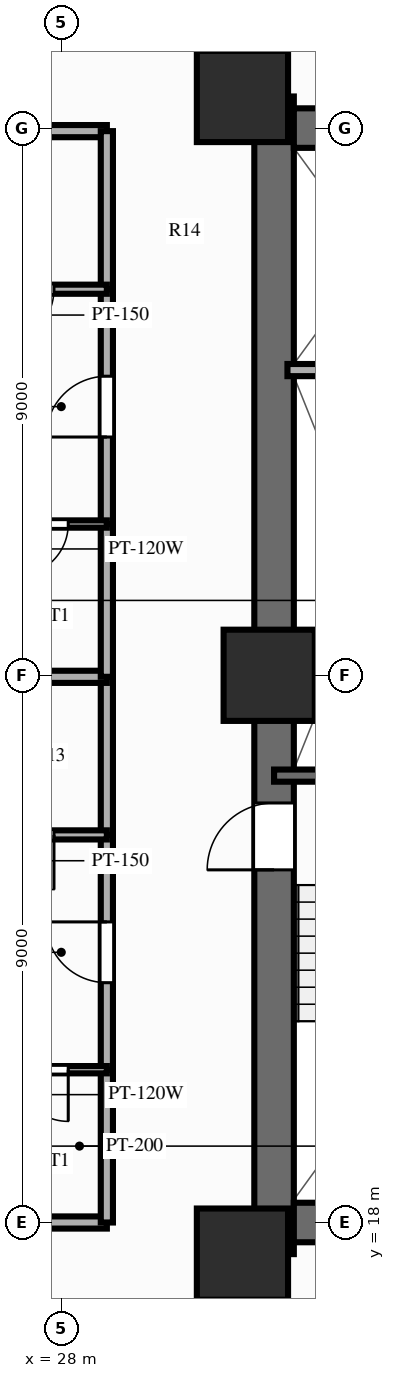
"""IFC4 building model, lengths in metres.
Left out: names, types, materials, properties, quantities, classifications, styles, units other than length and angle.
Written with IfcOpenShell. Run it as: python <this file> out.ifc"""

import sys

from ifc_helpers import new_model, si_unit, direction, frame, frame_2d, origin, origin_2d, place, context, subcontext, project, spatial, rectangle, extrude, source, transform, mapped, element, fill, save


model = new_model("IFC4")
c1 = context("Model", 3, precision=1e-05, world=origin(), true_north=direction((0.0, 1.0)))
c2 = subcontext(c1, "Body", "Model", "MODEL_VIEW")
j1 = project(units=[si_unit("LENGTHUNIT", "METRE"), si_unit("PLANEANGLEUNIT", "RADIAN")], contexts=[c1])
p1 = place(None, origin())
s1 = spatial("IfcSite", under=j1, at=p1, CompositionType="ELEMENT")
p2 = place(p1, origin())
s2 = spatial("IfcBuilding", under=s1, at=p2, CompositionType="ELEMENT")
p3 = place(p2, frame((0.0, 0.0, 52.4)))
s3 = spatial("IfcBuildingStorey", under=s2, at=p3, CompositionType="ELEMENT", Elevation=52.4)
p4 = place(p3, frame((31.5, 17.48, 0.0), z_axis=(0.0, 0.0, 1.0), x_axis=(0.0, 1.0, 0.0)))
e1 = element("IfcWall", 1, at=p4, inside=s3, PredefinedType="SHEAR", context=c2, shape_type="SweptSolid", body=[
    extrude(rectangle(XDim=19.04, YDim=0.65, at=frame_2d((9.52, 0.0))), origin(), (0.0, 0.0, 1.0), 3.0),
])
p5 = place(p4, frame((6.32, 0.0, 0.0)))
e2 = element("IfcOpeningElement", 2, at=p5, cuts=e1, PredefinedType="OPENING", context=c2, shape_type="SweptSolid", body=[
    extrude(rectangle(XDim=1.1, YDim=2.15, at=frame_2d((0.55, 1.075))), frame((0.0, 0.337, 0.0), z_axis=(0.0, -1.0, 0.0), x_axis=(1.0, 0.0, 0.0)), (0.0, 0.0, 1.0), 0.674),
])
p6 = place(p3, frame((31.825, 18.0, 0.0), z_axis=(0.0, 0.0, 1.0), x_axis=(1.0, 0.0, 0.0)))
e3 = element("IfcWall", 3, at=p6, inside=s3, PredefinedType="SHEAR", context=c2, shape_type="SweptSolid", body=[
    extrude(rectangle(XDim=12.35, YDim=0.65, at=frame_2d((6.175, 0.0))), origin(), (0.0, 0.0, 1.0), 3.0),
])
p7 = place(p3, frame((31.825, 36.0, 0.0), z_axis=(0.0, 0.0, 1.0), x_axis=(1.0, 0.0, 0.0)))
e4 = element("IfcWall", 4, at=p7, inside=s3, PredefinedType="SHEAR", context=c2, shape_type="SweptSolid", body=[
    extrude(rectangle(XDim=12.35, YDim=0.65, at=frame_2d((6.175, 0.0))), origin(), (0.0, 0.0, 1.0), 3.0),
])
p8 = place(p7, frame((5.125, 0.0, 0.0), z_axis=(0.0, 0.0, 1.0), x_axis=(-1.0, 0.0, 0.0)))
e5 = element("IfcOpeningElement", 5, at=p8, cuts=e4, PredefinedType="OPENING", context=c2, shape_type="SweptSolid", body=[
    extrude(rectangle(XDim=1.4, YDim=2.15, at=frame_2d((0.7, 1.075))), frame((0.0, 0.337, 0.0), z_axis=(0.0, -1.0, 0.0), x_axis=(1.0, 0.0, 0.0)), (0.0, 0.0, 1.0), 0.674),
])
m1 = source(origin(), c2, "Body", "SweptSolid", [
    extrude(rectangle(XDim=1.5, YDim=1.5, at=origin_2d()), origin(), (0.0, 0.0, 1.0), 3.0),
])
for number, where, z_axis, x_axis in (
    (6, (30.98, 17.48, 0.0), (0.0, 0.0, 1.0), (1.0, 0.0, 0.0)),
    (7, (30.98, 36.52, 0.0), (0.0, 0.0, 1.0), (1.0, 0.0, 0.0)),
    (8, (31.42, 27.0, 0.0), (0.0, 0.0, 1.0), (1.0, 0.0, 0.0)),
):
    element("IfcColumn", number, at=place(p3, frame(where, z_axis=z_axis, x_axis=x_axis)), inside=s3, PredefinedType="COLUMN", context=c2, shape_type="MappedRepresentation", body=[
        mapped(m1, transform((0.0, 0.0, 0.0), scale=1.0)),
    ])
p9 = place(p3, frame((31.5, 25.35, 0.0), z_axis=(0.0, 0.0, 1.0), x_axis=(1.0, 0.0, 0.0)))
e9 = element("IfcWall", 9, at=p9, inside=s3, PredefinedType="SOLIDWALL", context=c2, shape_type="SweptSolid", body=[
    extrude(rectangle(XDim=3.93, YDim=0.2, at=frame_2d((1.965, 0.0))), origin(), (0.0, 0.0, 1.0), 2.79),
])
p10 = place(p3, frame((31.72, 32.02, 0.0), z_axis=(0.0, 0.0, 1.0), x_axis=(1.0, 0.0, 0.0)))
e10 = element("IfcWall", 10, at=p10, inside=s3, PredefinedType="PARTITIONING", context=c2, shape_type="SweptSolid", body=[
    extrude(rectangle(XDim=2.8, YDim=0.2, at=frame_2d((1.4, 0.0))), origin(), (0.0, 0.0, 1.0), 2.79),
])
for number, where, z_axis, x_axis in (
    (11, (28.75, 18.0, 0.0), (0.0, 0.0, 1.0), (-1.0, 0.0, 0.0)),
    (12, (28.75, 35.95, 0.0), (0.0, 0.0, 1.0), (-1.0, 0.0, 0.0)),
):
    element("IfcWall", number, at=place(p3, frame(where, z_axis=z_axis, x_axis=x_axis)), inside=s3, PredefinedType="PARTITIONING", context=c2, shape_type="SweptSolid", body=[
        extrude(rectangle(XDim=16.6, YDim=0.2, at=frame_2d((8.3, 0.0))), origin(), (0.0, 0.0, 1.0), 2.24),
    ])
p11 = place(p3, frame((28.75, 18.0, 0.0), z_axis=(0.0, 0.0, 1.0), x_axis=(0.0, 1.0, 0.0)))
e13 = element("IfcWall", 13, at=p11, inside=s3, PredefinedType="PARTITIONING", context=c2, shape_type="SweptSolid", body=[
    extrude(rectangle(XDim=2.513, YDim=0.2, at=frame_2d((1.256, 0.0))), origin(), (0.0, 0.0, 1.0), 2.79),
])
p12 = place(p3, frame((28.75, 20.513, 0.0), z_axis=(0.0, 0.0, 1.0), x_axis=(0.0, 1.0, 0.0)))
e14 = element("IfcWall", 14, at=p12, inside=s3, PredefinedType="PARTITIONING", context=c2, shape_type="SweptSolid", body=[
    extrude(rectangle(XDim=3.862, YDim=0.2, at=frame_2d((1.931, 0.0))), origin(), (0.0, 0.0, 1.0), 2.79),
])
p13 = place(p12, frame((1.431, 0.0, 0.0)))
e15 = element("IfcOpeningElement", 15, at=p13, cuts=e14, PredefinedType="OPENING", context=c2, shape_type="SweptSolid", body=[
    extrude(rectangle(XDim=1.0, YDim=2.15, at=frame_2d((0.5, 1.075))), frame((0.0, 0.112, 0.0), z_axis=(0.0, -1.0, 0.0), x_axis=(1.0, 0.0, 0.0)), (0.0, 0.0, 1.0), 0.224),
])
p14 = place(p3, frame((28.75, 24.375, 0.0), z_axis=(0.0, 0.0, 1.0), x_axis=(0.0, 1.0, 0.0)))
e16 = element("IfcWall", 16, at=p14, inside=s3, PredefinedType="PARTITIONING", context=c2, shape_type="SweptSolid", body=[
    extrude(rectangle(XDim=2.6, YDim=0.2, at=frame_2d((1.3, 0.0))), origin(), (0.0, 0.0, 1.0), 2.79),
])
p15 = place(p3, frame((28.75, 20.513, 0.0), z_axis=(0.0, 0.0, 1.0), x_axis=(-1.0, 0.0, 0.0)))
e17 = element("IfcWall", 17, at=p15, inside=s3, PredefinedType="PARTITIONING", context=c2, shape_type="SweptSolid", body=[
    extrude(rectangle(XDim=2.12, YDim=0.12, at=frame_2d((1.06, 0.0))), origin(), (0.0, 0.0, 1.0), 2.79),
])
p16 = place(p15, frame((0.635, 0.0, 0.0)))
e18 = element("IfcOpeningElement", 18, at=p16, cuts=e17, PredefinedType="OPENING", context=c2, shape_type="SweptSolid", body=[
    extrude(rectangle(XDim=0.85, YDim=2.05, at=frame_2d((0.425, 1.025))), frame((0.0, 0.072, 0.0), z_axis=(0.0, -1.0, 0.0), x_axis=(1.0, 0.0, 0.0)), (0.0, 0.0, 1.0), 0.144),
])
p17 = place(p3, frame((28.75, 24.375, 0.0), z_axis=(0.0, 0.0, 1.0), x_axis=(-1.0, 0.0, 0.0)))
e19 = element("IfcWall", 19, at=p17, inside=s3, PredefinedType="PARTITIONING", context=c2, shape_type="SweptSolid", body=[
    extrude(rectangle(XDim=2.64, YDim=0.15, at=frame_2d((1.32, 0.0))), origin(), (0.0, 0.0, 1.0), 2.79),
])
p18 = place(p17, frame((0.87, 0.0, 0.0)))
e20 = element("IfcOpeningElement", 20, at=p18, cuts=e19, PredefinedType="OPENING", context=c2, shape_type="SweptSolid", body=[
    extrude(rectangle(XDim=0.9, YDim=2.1, at=frame_2d((0.45, 1.05))), frame((0.0, 0.087, 0.0), z_axis=(0.0, -1.0, 0.0), x_axis=(1.0, 0.0, 0.0)), (0.0, 0.0, 1.0), 0.174),
])
p19 = place(p3, frame((28.75, 26.975, 0.0), z_axis=(0.0, 0.0, 1.0), x_axis=(-1.0, 0.0, 0.0)))
e21 = element("IfcWall", 21, at=p19, inside=s3, PredefinedType="PARTITIONING", context=c2, shape_type="SweptSolid", body=[
    extrude(rectangle(XDim=16.6, YDim=0.2, at=frame_2d((8.3, 0.0))), origin(), (0.0, 0.0, 1.0), 2.79),
])
p20 = place(p3, frame((28.75, 26.975, 0.0), z_axis=(0.0, 0.0, 1.0), x_axis=(0.0, 1.0, 0.0)))
e22 = element("IfcWall", 22, at=p20, inside=s3, PredefinedType="PARTITIONING", context=c2, shape_type="SweptSolid", body=[
    extrude(rectangle(XDim=2.513, YDim=0.2, at=frame_2d((1.256, 0.0))), origin(), (0.0, 0.0, 1.0), 2.79),
])
p21 = place(p3, frame((28.75, 29.488, 0.0), z_axis=(0.0, 0.0, 1.0), x_axis=(0.0, 1.0, 0.0)))
e23 = element("IfcWall", 23, at=p21, inside=s3, PredefinedType="PARTITIONING", context=c2, shape_type="SweptSolid", body=[
    extrude(rectangle(XDim=3.862, YDim=0.2, at=frame_2d((1.931, 0.0))), origin(), (0.0, 0.0, 1.0), 2.79),
])
p22 = place(p21, frame((1.431, 0.0, 0.0)))
e24 = element("IfcOpeningElement", 24, at=p22, cuts=e23, PredefinedType="OPENING", context=c2, shape_type="SweptSolid", body=[
    extrude(rectangle(XDim=1.0, YDim=2.15, at=frame_2d((0.5, 1.075))), frame((0.0, 0.112, 0.0), z_axis=(0.0, -1.0, 0.0), x_axis=(1.0, 0.0, 0.0)), (0.0, 0.0, 1.0), 0.224),
])
p23 = place(p3, frame((28.75, 33.35, 0.0), z_axis=(0.0, 0.0, 1.0), x_axis=(0.0, 1.0, 0.0)))
e25 = element("IfcWall", 25, at=p23, inside=s3, PredefinedType="PARTITIONING", context=c2, shape_type="SweptSolid", body=[
    extrude(rectangle(XDim=2.6, YDim=0.2, at=frame_2d((1.3, 0.0))), origin(), (0.0, 0.0, 1.0), 2.79),
])
p24 = place(p3, frame((28.75, 29.488, 0.0), z_axis=(0.0, 0.0, 1.0), x_axis=(-1.0, 0.0, 0.0)))
e26 = element("IfcWall", 26, at=p24, inside=s3, PredefinedType="PARTITIONING", context=c2, shape_type="SweptSolid", body=[
    extrude(rectangle(XDim=2.12, YDim=0.12, at=frame_2d((1.06, 0.0))), origin(), (0.0, 0.0, 1.0), 2.79),
])
p25 = place(p24, frame((0.635, 0.0, 0.0)))
e27 = element("IfcOpeningElement", 27, at=p25, cuts=e26, PredefinedType="OPENING", context=c2, shape_type="SweptSolid", body=[
    extrude(rectangle(XDim=0.85, YDim=2.05, at=frame_2d((0.425, 1.025))), frame((0.0, 0.072, 0.0), z_axis=(0.0, -1.0, 0.0), x_axis=(1.0, 0.0, 0.0)), (0.0, 0.0, 1.0), 0.144),
])
p26 = place(p3, frame((28.75, 33.35, 0.0), z_axis=(0.0, 0.0, 1.0), x_axis=(-1.0, 0.0, 0.0)))
e28 = element("IfcWall", 28, at=p26, inside=s3, PredefinedType="PARTITIONING", context=c2, shape_type="SweptSolid", body=[
    extrude(rectangle(XDim=2.64, YDim=0.15, at=frame_2d((1.32, 0.0))), origin(), (0.0, 0.0, 1.0), 2.79),
])
p27 = place(p26, frame((0.87, 0.0, 0.0)))
e29 = element("IfcOpeningElement", 29, at=p27, cuts=e28, PredefinedType="OPENING", context=c2, shape_type="SweptSolid", body=[
    extrude(rectangle(XDim=0.9, YDim=2.1, at=frame_2d((0.45, 1.05))), frame((0.0, 0.087, 0.0), z_axis=(0.0, -1.0, 0.0), x_axis=(1.0, 0.0, 0.0)), (0.0, 0.0, 1.0), 0.174),
])
m2 = source(origin(), c2, "Body", "SweptSolid", [
    extrude(rectangle(XDim=1.1, YDim=2.15, at=frame_2d((0.55, 1.075))), frame((0.0, 0.025, 0.0), z_axis=(0.0, -1.0, 0.0), x_axis=(1.0, 0.0, 0.0)), (0.0, 0.0, 1.0), 0.05),
])
p28 = place(p5, origin())
e30 = element("IfcDoor", 30, at=p28, inside=s3, OperationType="SINGLE_SWING_LEFT", PredefinedType="DOOR", context=c2, shape_type="MappedRepresentation", body=[
    mapped(m2, transform((0.0, 0.0, 0.0), scale=1.0)),
])
fill(e2, e30)
m3 = source(origin(), c2, "Body", "SweptSolid", [
    extrude(rectangle(XDim=1.0, YDim=2.15, at=frame_2d((0.5, 1.075))), frame((0.0, 0.025, 0.0), z_axis=(0.0, -1.0, 0.0), x_axis=(1.0, 0.0, 0.0)), (0.0, 0.0, 1.0), 0.05),
])
p29 = place(p13, origin())
e31 = element("IfcDoor", 31, at=p29, inside=s3, OperationType="SINGLE_SWING_RIGHT", PredefinedType="DOOR", context=c2, shape_type="MappedRepresentation", body=[
    mapped(m3, transform((0.0, 0.0, 0.0), scale=1.0)),
])
fill(e15, e31)
m4 = source(origin(), c2, "Body", "SweptSolid", [
    extrude(rectangle(XDim=0.85, YDim=2.05, at=frame_2d((0.425, 1.025))), frame((0.0, 0.025, 0.0), z_axis=(0.0, -1.0, 0.0), x_axis=(1.0, 0.0, 0.0)), (0.0, 0.0, 1.0), 0.05),
])
p30 = place(p16, origin())
e32 = element("IfcDoor", 32, at=p30, inside=s3, OperationType="SINGLE_SWING_LEFT", PredefinedType="DOOR", context=c2, shape_type="MappedRepresentation", body=[
    mapped(m4, transform((0.0, 0.0, 0.0), scale=1.0)),
])
fill(e18, e32)
m5 = source(origin(), c2, "Body", "SweptSolid", [
    extrude(rectangle(XDim=0.9, YDim=2.1, at=frame_2d((0.45, 1.05))), frame((0.0, 0.025, 0.0), z_axis=(0.0, -1.0, 0.0), x_axis=(1.0, 0.0, 0.0)), (0.0, 0.0, 1.0), 0.05),
])
p31 = place(p18, origin())
e33 = element("IfcDoor", 33, at=p31, inside=s3, OperationType="SINGLE_SWING_LEFT", PredefinedType="DOOR", context=c2, shape_type="MappedRepresentation", body=[
    mapped(m5, transform((0.0, 0.0, 0.0), scale=1.0)),
])
fill(e20, e33)
p32 = place(p22, origin())
e34 = element("IfcDoor", 34, at=p32, inside=s3, OperationType="SINGLE_SWING_LEFT", PredefinedType="DOOR", context=c2, shape_type="MappedRepresentation", body=[
    mapped(m3, transform((0.0, 0.0, 0.0), scale=1.0)),
])
fill(e24, e34)
p33 = place(p25, origin())
e35 = element("IfcDoor", 35, at=p33, inside=s3, OperationType="SINGLE_SWING_RIGHT", PredefinedType="DOOR", context=c2, shape_type="MappedRepresentation", body=[
    mapped(m4, transform((0.0, 0.0, 0.0), scale=1.0)),
])
fill(e27, e35)
p34 = place(p27, origin())
e36 = element("IfcDoor", 36, at=p34, inside=s3, OperationType="SINGLE_SWING_RIGHT", PredefinedType="DOOR", context=c2, shape_type="MappedRepresentation", body=[
    mapped(m5, transform((0.0, 0.0, 0.0), scale=1.0)),
])
fill(e29, e36)
save(model, sys.argv[1])
